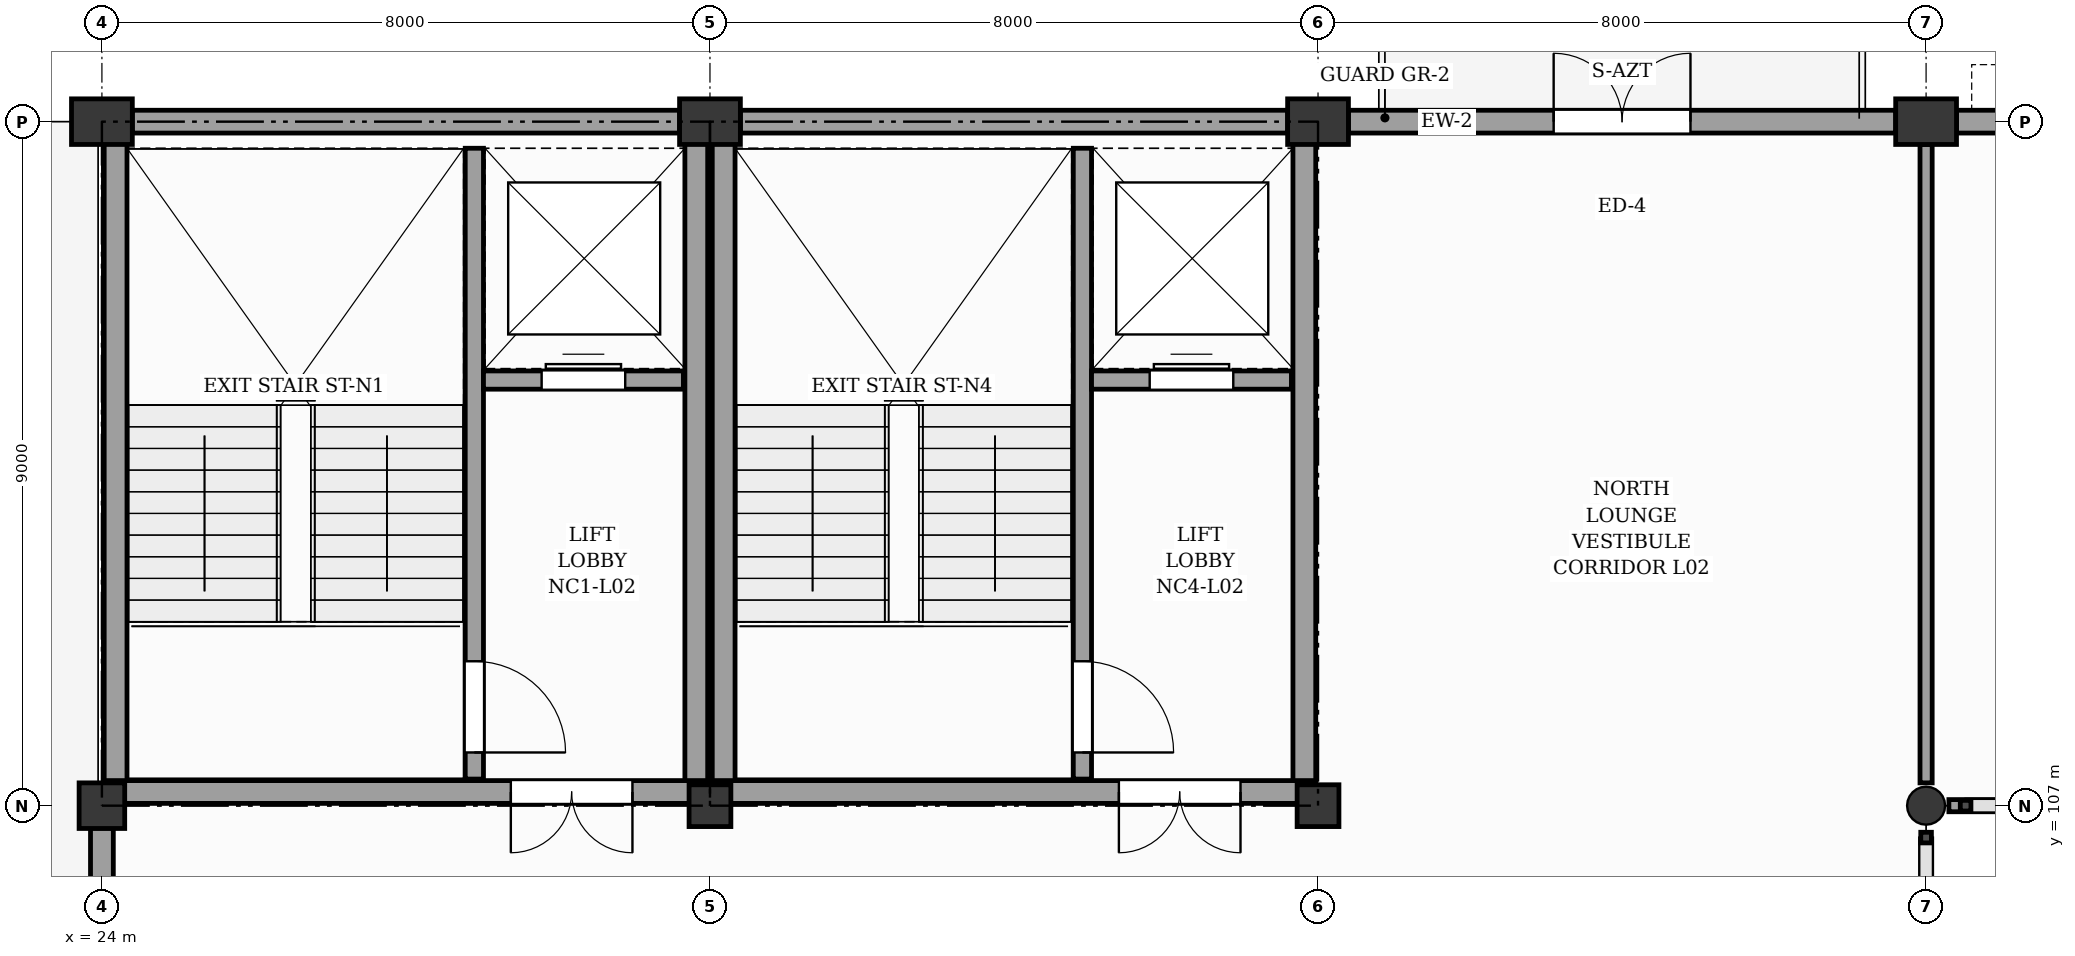
"""IFC4 building model, lengths in metres.
Left out: names, types, materials, properties, quantities, classifications, styles, units other than length and angle.
Written with IfcOpenShell. Run it as: python <this file> out.ifc"""

import sys

from ifc_helpers import new_model, si_unit, direction, frame, frame_2d, origin, origin_2d, place, context, subcontext, project, spatial, rectangle, circle, extrude, element, fill, save


model = new_model("IFC4")
c1 = context("Model", 3, precision=1e-05, world=origin(), true_north=direction((0.0, 1.0)))
c2 = subcontext(c1, "Body", "Model", "MODEL_VIEW")
j1 = project(units=[si_unit("LENGTHUNIT", "METRE"), si_unit("PLANEANGLEUNIT", "RADIAN")], contexts=[c1])
p1 = place(None, origin())
s1 = spatial("IfcSite", under=j1, at=p1, CompositionType="ELEMENT")
p2 = place(p1, origin())
s2 = spatial("IfcBuilding", under=s1, at=p2, CompositionType="ELEMENT")
p3 = place(p2, frame((0.0, 0.0, 9.6)))
s3 = spatial("IfcBuildingStorey", under=s2, at=p3, CompositionType="ELEMENT", Elevation=9.6)
p4 = place(p3, frame((24.0, 107.0, 0.0), z_axis=(0.0, 0.0, 1.0), x_axis=(1.0, 0.0, 0.0)))
e1 = element("IfcColumn", 1, at=p4, inside=s3, PredefinedType="COLUMN", context=c2, shape_type="SweptSolid", body=[
    extrude(rectangle(XDim=0.6, YDim=0.6, at=origin_2d()), origin(), (0.0, 0.0, 1.0), 6.6),
])
p5 = place(p3, frame((24.0, 116.0, 0.0), z_axis=(0.0, 0.0, 1.0), x_axis=(1.0, 0.0, 0.0)))
e2 = element("IfcColumn", 2, at=p5, inside=s3, PredefinedType="PILASTER", context=c2, shape_type="SweptSolid", body=[
    extrude(rectangle(XDim=0.8, YDim=0.6, at=origin_2d()), origin(), (0.0, 0.0, 1.0), 6.6),
])
p6 = place(p3, frame((32.0, 107.0, 0.0), z_axis=(0.0, 0.0, 1.0), x_axis=(1.0, 0.0, 0.0)))
e3 = element("IfcColumn", 3, at=p6, inside=s3, PredefinedType="COLUMN", context=c2, shape_type="SweptSolid", body=[
    extrude(rectangle(XDim=0.55, YDim=0.55, at=origin_2d()), origin(), (0.0, 0.0, 1.0), 6.6),
])
p7 = place(p3, frame((32.0, 116.0, 0.0), z_axis=(0.0, 0.0, 1.0), x_axis=(1.0, 0.0, 0.0)))
e4 = element("IfcColumn", 4, at=p7, inside=s3, PredefinedType="PILASTER", context=c2, shape_type="SweptSolid", body=[
    extrude(rectangle(XDim=0.8, YDim=0.6, at=origin_2d()), origin(), (0.0, 0.0, 1.0), 6.6),
])
p8 = place(p3, frame((40.0, 107.0, 0.0), z_axis=(0.0, 0.0, 1.0), x_axis=(1.0, 0.0, 0.0)))
e5 = element("IfcColumn", 5, at=p8, inside=s3, PredefinedType="COLUMN", context=c2, shape_type="SweptSolid", body=[
    extrude(rectangle(XDim=0.55, YDim=0.55, at=origin_2d()), origin(), (0.0, 0.0, 1.0), 6.6),
])
p9 = place(p3, frame((40.0, 116.0, 0.0), z_axis=(0.0, 0.0, 1.0), x_axis=(1.0, 0.0, 0.0)))
e6 = element("IfcColumn", 6, at=p9, inside=s3, PredefinedType="PILASTER", context=c2, shape_type="SweptSolid", body=[
    extrude(rectangle(XDim=0.8, YDim=0.6, at=origin_2d()), origin(), (0.0, 0.0, 1.0), 6.6),
])
p10 = place(p3, frame((48.0, 107.0, 0.0), z_axis=(0.0, 0.0, 1.0), x_axis=(1.0, 0.0, 0.0)))
e7 = element("IfcColumn", 7, at=p10, inside=s3, PredefinedType="COLUMN", context=c2, shape_type="SweptSolid", body=[
    extrude(circle(Radius=0.25, at=origin_2d()), origin(), (0.0, 0.0, 1.0), 6.6),
])
p11 = place(p3, frame((48.0, 116.0, 0.0), z_axis=(0.0, 0.0, 1.0), x_axis=(1.0, 0.0, 0.0)))
e8 = element("IfcColumn", 8, at=p11, inside=s3, PredefinedType="PILASTER", context=c2, shape_type="SweptSolid", body=[
    extrude(rectangle(XDim=0.8, YDim=0.6, at=origin_2d()), origin(), (0.0, 0.0, 1.0), 6.6),
])
for number, where, z_axis, x_axis in (
    (9, (24.4, 116.0, 0.0), (0.0, 0.0, 1.0), (1.0, 0.0, 0.0)),
    (10, (32.4, 116.0, 0.0), (0.0, 0.0, 1.0), (1.0, 0.0, 0.0)),
):
    element("IfcWall", number, at=place(p3, frame(where, z_axis=z_axis, x_axis=x_axis)), inside=s3, PredefinedType="SOLIDWALL", context=c2, shape_type="SweptSolid", body=[
        extrude(rectangle(XDim=7.2, YDim=0.3, at=frame_2d((3.6, 0.0))), origin(), (0.0, 0.0, 1.0), 5.64),
    ])
p12 = place(p3, frame((40.4, 116.0, 0.0), z_axis=(0.0, 0.0, 1.0), x_axis=(1.0, 0.0, 0.0)))
e11 = element("IfcWall", 11, at=p12, inside=s3, PredefinedType="SOLIDWALL", context=c2, shape_type="SweptSolid", body=[
    extrude(rectangle(XDim=7.2, YDim=0.3, at=frame_2d((3.6, 0.0))), origin(), (0.0, 0.0, 1.0), 5.64),
])
p13 = place(p12, frame((2.7, 0.0, 0.0)))
e12 = element("IfcOpeningElement", 12, at=p13, cuts=e11, PredefinedType="OPENING", context=c2, shape_type="SweptSolid", body=[
    extrude(rectangle(XDim=1.8, YDim=2.2, at=frame_2d((0.9, 1.1))), frame((0.0, 0.16, 0.0), z_axis=(0.0, -1.0, 0.0), x_axis=(1.0, 0.0, 0.0)), (0.0, 0.0, 1.0), 0.32),
])
p14 = place(p3, frame((48.4, 116.0, 0.0), z_axis=(0.0, 0.0, 1.0), x_axis=(1.0, 0.0, 0.0)))
e13 = element("IfcWall", 13, at=p14, inside=s3, PredefinedType="SOLIDWALL", context=c2, shape_type="SweptSolid", body=[
    extrude(rectangle(XDim=7.2, YDim=0.3, at=frame_2d((3.6, 0.0))), origin(), (0.0, 0.0, 1.0), 5.64),
])
p15 = place(p14, frame((2.4, 0.0, 0.9)))
e14 = element("IfcOpeningElement", 14, at=p15, cuts=e13, PredefinedType="OPENING", context=c2, shape_type="SweptSolid", body=[
    extrude(rectangle(XDim=2.4, YDim=3.2, at=frame_2d((1.2, 1.6))), frame((0.0, 0.16, 0.0), z_axis=(0.0, -1.0, 0.0), x_axis=(1.0, 0.0, 0.0)), (0.0, 0.0, 1.0), 0.32),
])
p16 = place(p3, frame((24.0, 98.295, 0.0), z_axis=(0.0, 0.0, 1.0), x_axis=(0.0, 1.0, 0.0)))
e15 = element("IfcWall", 15, at=p16, inside=s3, PredefinedType="SOLIDWALL", context=c2, shape_type="SweptSolid", body=[
    extrude(rectangle(XDim=8.41, YDim=0.3, at=frame_2d((4.205, 0.0))), origin(), (0.0, 0.0, 1.0), 5.64),
])
p17 = place(p16, frame((3.405, 0.0, 0.95)))
e16 = element("IfcOpeningElement", 16, at=p17, cuts=e15, PredefinedType="OPENING", context=c2, shape_type="SweptSolid", body=[
    extrude(rectangle(XDim=1.6, YDim=2.1, at=frame_2d((0.8, 1.05))), frame((0.0, 0.16, 0.0), z_axis=(0.0, -1.0, 0.0), x_axis=(1.0, 0.0, 0.0)), (0.0, 0.0, 1.0), 0.32),
])
p18 = place(p3, frame((28.9, 107.35, 0.0), z_axis=(0.0, 0.0, 1.0), x_axis=(0.0, 1.0, 0.0)))
e17 = element("IfcWall", 17, at=p18, inside=s3, PredefinedType="SHEAR", context=c2, shape_type="SweptSolid", body=[
    extrude(rectangle(XDim=8.3, YDim=0.24, at=frame_2d((4.15, 0.0))), origin(), (0.0, 0.0, 1.0), 6.32),
])
p19 = place(p18, frame((0.35, 0.0, 0.0)))
e18 = element("IfcOpeningElement", 18, at=p19, cuts=e17, PredefinedType="OPENING", context=c2, shape_type="SweptSolid", body=[
    extrude(rectangle(XDim=1.2, YDim=2.15, at=frame_2d((0.6, 1.075))), frame((0.0, 0.13, 0.0), z_axis=(0.0, -1.0, 0.0), x_axis=(1.0, 0.0, 0.0)), (0.0, 0.0, 1.0), 0.26),
])
p20 = place(p3, frame((29.02, 112.6, 0.0), z_axis=(0.0, 0.0, 1.0), x_axis=(1.0, 0.0, 0.0)))
e19 = element("IfcWall", 19, at=p20, inside=s3, PredefinedType="SHEAR", context=c2, shape_type="SweptSolid", body=[
    extrude(rectangle(XDim=2.63, YDim=0.24, at=frame_2d((1.315, 0.0))), origin(), (0.0, 0.0, 1.0), 6.32),
])
p21 = place(p20, frame((0.765, 0.0, 0.0)))
e20 = element("IfcOpeningElement", 20, at=p21, cuts=e19, PredefinedType="OPENING", context=c2, shape_type="SweptSolid", body=[
    extrude(rectangle(XDim=1.1, YDim=2.15, at=frame_2d((0.55, 1.075))), frame((0.0, 0.13, 0.0), z_axis=(0.0, -1.0, 0.0), x_axis=(1.0, 0.0, 0.0)), (0.0, 0.0, 1.0), 0.26),
])
for number, where, z_axis, x_axis in (
    (21, (24.18, 107.18, 0.0), (0.0, 0.0, 1.0), (0.0, 1.0, 0.0)),
    (22, (31.82, 107.18, 0.0), (0.0, 0.0, 1.0), (0.0, 1.0, 0.0)),
):
    element("IfcWall", number, at=place(p3, frame(where, z_axis=z_axis, x_axis=x_axis)), inside=s3, PredefinedType="SHEAR", context=c2, shape_type="SweptSolid", body=[
        extrude(rectangle(XDim=8.64, YDim=0.3, at=frame_2d((4.32, 0.0))), origin(), (0.0, 0.0, 1.0), 6.32),
    ])
p22 = place(p3, frame((24.03, 107.18, 0.0), z_axis=(0.0, 0.0, 1.0), x_axis=(1.0, 0.0, 0.0)))
e23 = element("IfcWall", 23, at=p22, inside=s3, PredefinedType="SHEAR", context=c2, shape_type="SweptSolid", body=[
    extrude(rectangle(XDim=7.94, YDim=0.3, at=frame_2d((3.97, 0.0))), origin(), (0.0, 0.0, 1.0), 6.32),
])
p23 = place(p22, frame((5.35, 0.0, 0.0)))
e24 = element("IfcOpeningElement", 24, at=p23, cuts=e23, PredefinedType="OPENING", context=c2, shape_type="SweptSolid", body=[
    extrude(rectangle(XDim=1.6, YDim=2.15, at=frame_2d((0.8, 1.075))), frame((0.0, 0.16, 0.0), z_axis=(0.0, -1.0, 0.0), x_axis=(1.0, 0.0, 0.0)), (0.0, 0.0, 1.0), 0.32),
])
p24 = place(p3, frame((36.9, 107.35, 0.0), z_axis=(0.0, 0.0, 1.0), x_axis=(0.0, 1.0, 0.0)))
e25 = element("IfcWall", 25, at=p24, inside=s3, PredefinedType="SHEAR", context=c2, shape_type="SweptSolid", body=[
    extrude(rectangle(XDim=8.3, YDim=0.24, at=frame_2d((4.15, 0.0))), origin(), (0.0, 0.0, 1.0), 6.32),
])
p25 = place(p24, frame((0.35, 0.0, 0.0)))
e26 = element("IfcOpeningElement", 26, at=p25, cuts=e25, PredefinedType="OPENING", context=c2, shape_type="SweptSolid", body=[
    extrude(rectangle(XDim=1.2, YDim=2.15, at=frame_2d((0.6, 1.075))), frame((0.0, 0.13, 0.0), z_axis=(0.0, -1.0, 0.0), x_axis=(1.0, 0.0, 0.0)), (0.0, 0.0, 1.0), 0.26),
])
p26 = place(p3, frame((37.02, 112.6, 0.0), z_axis=(0.0, 0.0, 1.0), x_axis=(1.0, 0.0, 0.0)))
e27 = element("IfcWall", 27, at=p26, inside=s3, PredefinedType="SHEAR", context=c2, shape_type="SweptSolid", body=[
    extrude(rectangle(XDim=2.63, YDim=0.24, at=frame_2d((1.315, 0.0))), origin(), (0.0, 0.0, 1.0), 6.32),
])
p27 = place(p26, frame((0.765, 0.0, 0.0)))
e28 = element("IfcOpeningElement", 28, at=p27, cuts=e27, PredefinedType="OPENING", context=c2, shape_type="SweptSolid", body=[
    extrude(rectangle(XDim=1.1, YDim=2.15, at=frame_2d((0.55, 1.075))), frame((0.0, 0.13, 0.0), z_axis=(0.0, -1.0, 0.0), x_axis=(1.0, 0.0, 0.0)), (0.0, 0.0, 1.0), 0.26),
])
for number, where, z_axis, x_axis in (
    (29, (32.18, 107.18, 0.0), (0.0, 0.0, 1.0), (0.0, 1.0, 0.0)),
    (30, (39.82, 107.18, 0.0), (0.0, 0.0, 1.0), (0.0, 1.0, 0.0)),
):
    element("IfcWall", number, at=place(p3, frame(where, z_axis=z_axis, x_axis=x_axis)), inside=s3, PredefinedType="SHEAR", context=c2, shape_type="SweptSolid", body=[
        extrude(rectangle(XDim=8.64, YDim=0.3, at=frame_2d((4.32, 0.0))), origin(), (0.0, 0.0, 1.0), 6.32),
    ])
p28 = place(p3, frame((32.03, 107.18, 0.0), z_axis=(0.0, 0.0, 1.0), x_axis=(1.0, 0.0, 0.0)))
e31 = element("IfcWall", 31, at=p28, inside=s3, PredefinedType="SHEAR", context=c2, shape_type="SweptSolid", body=[
    extrude(rectangle(XDim=7.94, YDim=0.3, at=frame_2d((3.97, 0.0))), origin(), (0.0, 0.0, 1.0), 6.32),
])
p29 = place(p28, frame((5.35, 0.0, 0.0)))
e32 = element("IfcOpeningElement", 32, at=p29, cuts=e31, PredefinedType="OPENING", context=c2, shape_type="SweptSolid", body=[
    extrude(rectangle(XDim=1.6, YDim=2.15, at=frame_2d((0.8, 1.075))), frame((0.0, 0.16, 0.0), z_axis=(0.0, -1.0, 0.0), x_axis=(1.0, 0.0, 0.0)), (0.0, 0.0, 1.0), 0.32),
])
p30 = place(p3, frame((48.3, 107.0, 0.0), z_axis=(0.0, 0.0, 1.0), x_axis=(1.0, 0.0, 0.0)))
e33 = element("IfcWall", 33, at=p30, inside=s3, PredefinedType="PARTITIONING", context=c2, shape_type="SweptSolid", body=[
    extrude(rectangle(XDim=7.4, YDim=0.16, at=frame_2d((3.7, 0.0))), origin(), (0.0, 0.0, 1.0), 5.5),
])
p31 = place(p3, frame((48.0, 107.3, 0.0), z_axis=(0.0, 0.0, 1.0), x_axis=(0.0, 1.0, 0.0)))
e34 = element("IfcWall", 34, at=p31, inside=s3, PredefinedType="PARTITIONING", context=c2, shape_type="SweptSolid", body=[
    extrude(rectangle(XDim=8.4, YDim=0.16, at=frame_2d((4.2, 0.0))), origin(), (0.0, 0.0, 1.0), 5.5),
])
p32 = place(p13, origin())
e35 = element("IfcDoor", 35, at=p32, inside=s3, OperationType="DOUBLE_DOOR_SINGLE_SWING", PredefinedType="DOOR", context=c2, shape_type="SweptSolid", body=[
    extrude(rectangle(XDim=1.8, YDim=2.2, at=frame_2d((0.9, 1.1))), frame((0.0, 0.025, 0.0), z_axis=(0.0, -1.0, 0.0), x_axis=(1.0, 0.0, 0.0)), (0.0, 0.0, 1.0), 0.05),
])
fill(e12, e35)
p33 = place(p19, frame((1.2, 0.0, 0.0), z_axis=(0.0, 0.0, 1.0), x_axis=(-1.0, 0.0, 0.0)))
e36 = element("IfcDoor", 36, at=p33, inside=s3, OperationType="SINGLE_SWING_LEFT", PredefinedType="DOOR", context=c2, shape_type="SweptSolid", body=[
    extrude(rectangle(XDim=1.2, YDim=2.15, at=frame_2d((0.6, 1.075))), frame((0.0, 0.025, 0.0), z_axis=(0.0, -1.0, 0.0), x_axis=(1.0, 0.0, 0.0)), (0.0, 0.0, 1.0), 0.05),
])
fill(e18, e36)
p34 = place(p21, origin())
e37 = element("IfcDoor", 37, at=p34, inside=s3, OperationType="DOUBLE_DOOR_SLIDING", PredefinedType="DOOR", context=c2, shape_type="SweptSolid", body=[
    extrude(rectangle(XDim=1.1, YDim=2.15, at=frame_2d((0.55, 1.075))), frame((0.0, 0.025, 0.0), z_axis=(0.0, -1.0, 0.0), x_axis=(1.0, 0.0, 0.0)), (0.0, 0.0, 1.0), 0.05),
])
fill(e20, e37)
p35 = place(p23, frame((1.6, 0.0, 0.0), z_axis=(0.0, 0.0, 1.0), x_axis=(-1.0, 0.0, 0.0)))
e38 = element("IfcDoor", 38, at=p35, inside=s3, OperationType="DOUBLE_DOOR_SINGLE_SWING", PredefinedType="DOOR", context=c2, shape_type="SweptSolid", body=[
    extrude(rectangle(XDim=1.6, YDim=2.15, at=frame_2d((0.8, 1.075))), frame((0.0, 0.025, 0.0), z_axis=(0.0, -1.0, 0.0), x_axis=(1.0, 0.0, 0.0)), (0.0, 0.0, 1.0), 0.05),
])
fill(e24, e38)
p36 = place(p25, frame((1.2, 0.0, 0.0), z_axis=(0.0, 0.0, 1.0), x_axis=(-1.0, 0.0, 0.0)))
e39 = element("IfcDoor", 39, at=p36, inside=s3, OperationType="SINGLE_SWING_LEFT", PredefinedType="DOOR", context=c2, shape_type="SweptSolid", body=[
    extrude(rectangle(XDim=1.2, YDim=2.15, at=frame_2d((0.6, 1.075))), frame((0.0, 0.025, 0.0), z_axis=(0.0, -1.0, 0.0), x_axis=(1.0, 0.0, 0.0)), (0.0, 0.0, 1.0), 0.05),
])
fill(e26, e39)
p37 = place(p27, origin())
e40 = element("IfcDoor", 40, at=p37, inside=s3, OperationType="DOUBLE_DOOR_SLIDING", PredefinedType="DOOR", context=c2, shape_type="SweptSolid", body=[
    extrude(rectangle(XDim=1.1, YDim=2.15, at=frame_2d((0.55, 1.075))), frame((0.0, 0.025, 0.0), z_axis=(0.0, -1.0, 0.0), x_axis=(1.0, 0.0, 0.0)), (0.0, 0.0, 1.0), 0.05),
])
fill(e28, e40)
p38 = place(p29, frame((1.6, 0.0, 0.0), z_axis=(0.0, 0.0, 1.0), x_axis=(-1.0, 0.0, 0.0)))
e41 = element("IfcDoor", 41, at=p38, inside=s3, OperationType="DOUBLE_DOOR_SINGLE_SWING", PredefinedType="DOOR", context=c2, shape_type="SweptSolid", body=[
    extrude(rectangle(XDim=1.6, YDim=2.15, at=frame_2d((0.8, 1.075))), frame((0.0, 0.025, 0.0), z_axis=(0.0, -1.0, 0.0), x_axis=(1.0, 0.0, 0.0)), (0.0, 0.0, 1.0), 0.05),
])
fill(e32, e41)
save(model, sys.argv[1])
